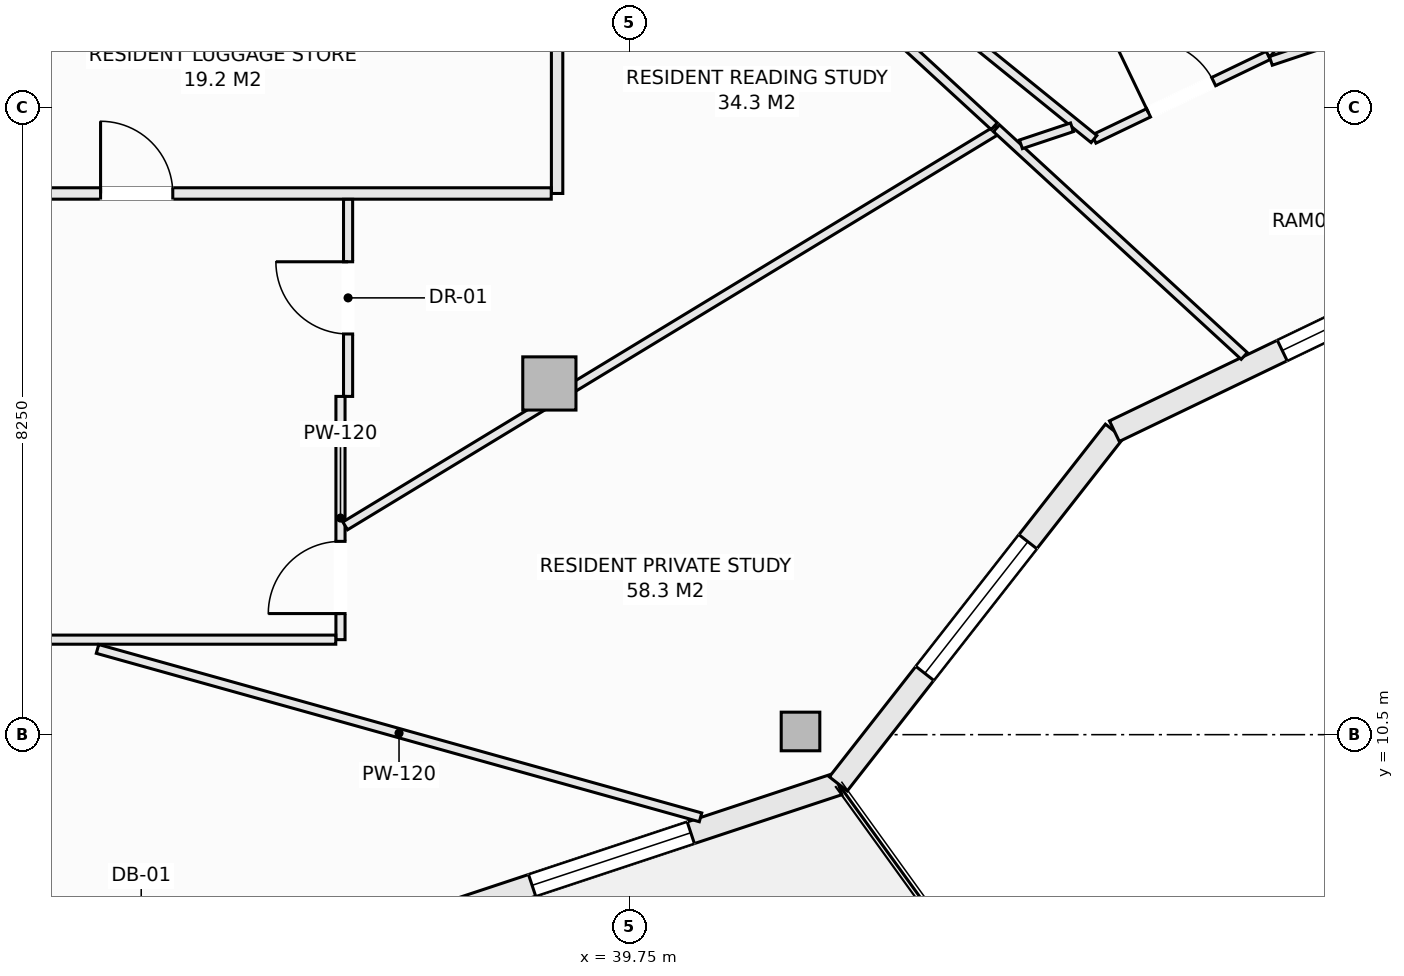
"""IFC4 building model, lengths in metres.
Left out: names, types, materials, properties, quantities, classifications, styles, units other than length and angle.
Written with IfcOpenShell. Run it as: python <this file> out.ifc"""

import sys

from ifc_helpers import new_model, si_unit, direction, frame, frame_2d, origin, origin_2d, place, context, subcontext, project, spatial, rectangle, hollow_rectangle, extrude, element, fill, save


model = new_model("IFC4")
c1 = context("Model", 3, precision=1e-05, world=origin(), true_north=direction((0.0, 1.0)))
c2 = subcontext(c1, "Body", "Model", "MODEL_VIEW")
j1 = project(units=[si_unit("LENGTHUNIT", "METRE"), si_unit("PLANEANGLEUNIT", "RADIAN")], contexts=[c1])
p1 = place(None, origin())
s1 = spatial("IfcSite", under=j1, at=p1, CompositionType="ELEMENT")
p2 = place(p1, origin())
s2 = spatial("IfcBuilding", under=s1, at=p2, CompositionType="ELEMENT")
p3 = place(p2, frame((0.0, 0.0, 222.8)))
s3 = spatial("IfcBuildingStorey", under=s2, at=p3, CompositionType="ELEMENT", Elevation=222.8)
p4 = place(p3, frame((42.003, 10.542, -0.27), z_axis=(0.0, 0.0, 1.0), x_axis=(1.0, 0.0, 0.0)))
e1 = element("IfcColumn", 1, at=p4, inside=s3, PredefinedType="COLUMN", context=c2, shape_type="SweptSolid", body=[
    extrude(hollow_rectangle(XDim=0.508, YDim=0.508, WallThickness=0.019, at=origin_2d()), origin(), (0.0, 0.0, 1.0), 3.3),
])
p5 = place(p3, frame((38.698, 15.121, -0.27), z_axis=(0.0, 0.0, 1.0), x_axis=(1.0, 0.0, 0.0)))
e2 = element("IfcColumn", 2, at=p5, inside=s3, PredefinedType="COLUMN", context=c2, shape_type="SweptSolid", body=[
    extrude(rectangle(XDim=0.7, YDim=0.7, at=origin_2d()), origin(), (0.0, 0.0, 1.0), 3.3),
])
p6 = place(p3, frame((36.531, 7.875, 0.0), z_axis=(0.0, 0.0, 1.0), x_axis=(0.949240877604, 0.314550085495, 0.0)))
e3 = element("IfcWall", 3, at=p6, inside=s3, PredefinedType="SOLIDWALL", context=c2, shape_type="SweptSolid", body=[
    extrude(rectangle(XDim=6.288, YDim=0.3, at=frame_2d((3.144, 0.0))), origin(), (0.0, 0.0, 1.0), 2.605),
])
p7 = place(p6, frame((2.044, 0.0, 0.72)))
e4 = element("IfcOpeningElement", 4, at=p7, cuts=e3, PredefinedType="OPENING", context=c2, shape_type="SweptSolid", body=[
    extrude(rectangle(XDim=2.2, YDim=1.65, at=frame_2d((1.1, 0.825))), frame((0.0, 0.16, 0.0), z_axis=(0.0, -1.0, 0.0), x_axis=(1.0, 0.0, 0.0)), (0.0, 0.0, 1.0), 0.32),
])
p8 = place(p3, frame((42.5, 9.853, 0.0), z_axis=(0.0, 0.0, 1.0), x_axis=(0.616450126935, 0.787393955401, 0.0)))
e5 = element("IfcWall", 5, at=p8, inside=s3, PredefinedType="SOLIDWALL", context=c2, shape_type="SweptSolid", body=[
    extrude(rectangle(XDim=5.893, YDim=0.3, at=frame_2d((2.946, 0.0))), origin(), (0.0, 0.0, 1.0), 2.605),
])
p9 = place(p8, frame((1.846, 0.0, 0.72)))
e6 = element("IfcOpeningElement", 6, at=p9, cuts=e5, PredefinedType="OPENING", context=c2, shape_type="SweptSolid", body=[
    extrude(rectangle(XDim=2.2, YDim=1.65, at=frame_2d((1.1, 0.825))), frame((0.0, 0.16, 0.0), z_axis=(0.0, -1.0, 0.0), x_axis=(1.0, 0.0, 0.0)), (0.0, 0.0, 1.0), 0.32),
])
p10 = place(p3, frame((46.133, 14.493, 0.0), z_axis=(0.0, 0.0, 1.0), x_axis=(0.901348331142, 0.433094892545, 0.0)))
e7 = element("IfcWall", 7, at=p10, inside=s3, PredefinedType="SOLIDWALL", context=c2, shape_type="SweptSolid", body=[
    extrude(rectangle(XDim=6.021, YDim=0.3, at=frame_2d((3.01, 0.0))), origin(), (0.0, 0.0, 1.0), 2.605),
])
p11 = place(p10, frame((2.45, 0.0, 0.72)))
e8 = element("IfcOpeningElement", 8, at=p11, cuts=e7, PredefinedType="OPENING", context=c2, shape_type="SweptSolid", body=[
    extrude(rectangle(XDim=2.2, YDim=1.65, at=frame_2d((1.1, 0.825))), frame((0.0, 0.16, 0.0), z_axis=(0.0, -1.0, 0.0), x_axis=(1.0, 0.0, 0.0)), (0.0, 0.0, 1.0), 0.32),
])
p12 = place(p3, frame((38.8, 17.62, 0.0), z_axis=(0.0, 0.0, 1.0), x_axis=(0.0, 1.0, 0.0)))
e9 = element("IfcWall", 9, at=p12, inside=s3, PredefinedType="PARTITIONING", context=c2, shape_type="SweptSolid", body=[
    extrude(rectangle(XDim=2.18, YDim=0.15, at=frame_2d((1.09, 0.0))), origin(), (0.0, 0.0, 1.0), 3.03),
])
p13 = place(p3, frame((30.077, 17.62, 0.0), z_axis=(0.0, 0.0, 1.0), x_axis=(1.0, 0.0, 0.0)))
e10 = element("IfcWall", 10, at=p13, inside=s3, PredefinedType="PARTITIONING", context=c2, shape_type="SweptSolid", body=[
    extrude(rectangle(XDim=8.646, YDim=0.15, at=frame_2d((4.323, 0.0))), origin(), (0.0, 0.0, 1.0), 3.03),
])
p14 = place(p13, frame((2.717, 0.0, 0.0)))
e11 = element("IfcOpeningElement", 11, at=p14, cuts=e10, PredefinedType="OPENING", context=c2, shape_type="SweptSolid", body=[
    extrude(rectangle(XDim=0.95, YDim=2.1, at=frame_2d((0.475, 1.05))), frame((0.0, 0.085, 0.0), z_axis=(0.0, -1.0, 0.0), x_axis=(1.0, 0.0, 0.0)), (0.0, 0.0, 1.0), 0.17),
])
p15 = place(p3, frame((41.52, 24.892, 0.0), z_axis=(0.0, 0.0, 1.0), x_axis=(0.777027167904, -0.629467060567, 0.0)))
e12 = element("IfcWall", 12, at=p15, inside=s3, PredefinedType="PARTITIONING", context=c2, shape_type="SweptSolid", body=[
    extrude(rectangle(XDim=8.62, YDim=0.12, at=frame_2d((4.31, 0.0))), origin(), (0.0, 0.0, 1.0), 2.77),
])
p16 = place(p15, frame((5.4, 0.0, 0.0)))
e13 = element("IfcOpeningElement", 13, at=p16, cuts=e12, PredefinedType="OPENING", context=c2, shape_type="SweptSolid", body=[
    extrude(rectangle(XDim=0.95, YDim=2.1, at=frame_2d((0.475, 1.05))), frame((0.0, 0.07, 0.0), z_axis=(0.0, -1.0, 0.0), x_axis=(1.0, 0.0, 0.0)), (0.0, 0.0, 1.0), 0.14),
])
p17 = place(p15, frame((1.578, 0.0, 0.0)))
e14 = element("IfcOpeningElement", 14, at=p17, cuts=e12, PredefinedType="OPENING", context=c2, shape_type="SweptSolid", body=[
    extrude(rectangle(XDim=0.95, YDim=2.1, at=frame_2d((0.475, 1.05))), frame((0.0, 0.07, 0.0), z_axis=(0.0, -1.0, 0.0), x_axis=(1.0, 0.0, 0.0)), (0.0, 0.0, 1.0), 0.14),
])
p18 = place(p3, frame((45.864, 18.336, 0.0), z_axis=(0.0, 0.0, 1.0), x_axis=(0.901512568896, 0.432752918097, 0.0)))
e15 = element("IfcWall", 15, at=p18, inside=s3, PredefinedType="PARTITIONING", context=c2, shape_type="SweptSolid", body=[
    extrude(rectangle(XDim=2.543, YDim=0.12, at=frame_2d((1.271, 0.0))), origin(), (0.0, 0.0, 1.0), 3.03),
])
p19 = place(p18, frame((0.796, 0.0, 0.0)))
e16 = element("IfcOpeningElement", 16, at=p19, cuts=e15, PredefinedType="OPENING", context=c2, shape_type="SweptSolid", body=[
    extrude(rectangle(XDim=0.95, YDim=2.1, at=frame_2d((0.475, 1.05))), frame((0.0, 0.07, 0.0), z_axis=(0.0, -1.0, 0.0), x_axis=(1.0, 0.0, 0.0)), (0.0, 0.0, 1.0), 0.14),
])
p20 = place(p3, frame((42.198, 21.306, 0.0), z_axis=(0.0, 0.0, 1.0), x_axis=(0.777012245854, -0.629485480208, 0.0)))
e17 = element("IfcWall", 17, at=p20, inside=s3, PredefinedType="PARTITIONING", context=c2, shape_type="SweptSolid", body=[
    extrude(rectangle(XDim=4.718, YDim=0.12, at=frame_2d((2.359, 0.0))), origin(), (0.0, 0.0, 1.0), 2.77),
])
p21 = place(p3, frame((36.05, 14.95, 0.0), z_axis=(0.0, 0.0, 1.0), x_axis=(0.0, 1.0, 0.0)))
e18 = element("IfcWall", 18, at=p21, inside=s3, PredefinedType="PARTITIONING", context=c2, shape_type="SweptSolid", body=[
    extrude(rectangle(XDim=2.593, YDim=0.12, at=frame_2d((1.296, 0.0))), origin(), (0.0, 0.0, 1.0), 3.03),
])
p22 = place(p21, frame((0.822, 0.0, 0.0)))
e19 = element("IfcOpeningElement", 19, at=p22, cuts=e18, PredefinedType="OPENING", context=c2, shape_type="SweptSolid", body=[
    extrude(rectangle(XDim=0.95, YDim=2.1, at=frame_2d((0.475, 1.05))), frame((0.0, 0.07, 0.0), z_axis=(0.0, -1.0, 0.0), x_axis=(1.0, 0.0, 0.0)), (0.0, 0.0, 1.0), 0.14),
])
p23 = place(p3, frame((35.95, 11.75, 0.0), z_axis=(0.0, 0.0, 1.0), x_axis=(0.0, 1.0, 0.0)))
e20 = element("IfcWall", 20, at=p23, inside=s3, PredefinedType="PARTITIONING", context=c2, shape_type="SweptSolid", body=[
    extrude(rectangle(XDim=3.2, YDim=0.12, at=frame_2d((1.6, 0.0))), origin(), (0.0, 0.0, 1.0), 3.03),
])
p24 = place(p23, frame((0.343, 0.0, 0.0)))
e21 = element("IfcOpeningElement", 21, at=p24, cuts=e20, PredefinedType="OPENING", context=c2, shape_type="SweptSolid", body=[
    extrude(rectangle(XDim=0.95, YDim=2.1, at=frame_2d((0.475, 1.05))), frame((0.0, 0.07, 0.0), z_axis=(0.0, -1.0, 0.0), x_axis=(1.0, 0.0, 0.0)), (0.0, 0.0, 1.0), 0.14),
])
p25 = place(p3, frame((27.227, 11.75, 0.0), z_axis=(0.0, 0.0, 1.0), x_axis=(1.0, 0.0, 0.0)))
e22 = element("IfcWall", 22, at=p25, inside=s3, PredefinedType="PARTITIONING", context=c2, shape_type="SweptSolid", body=[
    extrude(rectangle(XDim=8.661, YDim=0.12, at=frame_2d((4.331, 0.0))), origin(), (0.0, 0.0, 1.0), 3.03),
])
p26 = place(p25, frame((2.602, 0.0, 0.0)))
e23 = element("IfcOpeningElement", 23, at=p26, cuts=e22, PredefinedType="OPENING", context=c2, shape_type="SweptSolid", body=[
    extrude(rectangle(XDim=0.95, YDim=2.1, at=frame_2d((0.475, 1.05))), frame((0.0, 0.07, 0.0), z_axis=(0.0, -1.0, 0.0), x_axis=(1.0, 0.0, 0.0)), (0.0, 0.0, 1.0), 0.14),
])
p27 = place(p3, frame((32.753, 11.628, 0.0), z_axis=(0.0, 0.0, 1.0), x_axis=(0.96314203236, -0.26899335587, 0.0)))
e24 = element("IfcWall", 24, at=p27, inside=s3, PredefinedType="PARTITIONING", context=c2, shape_type="SweptSolid", body=[
    extrude(rectangle(XDim=8.238, YDim=0.12, at=frame_2d((4.119, 0.0))), origin(), (0.0, 0.0, 1.0), 2.605),
])
p28 = place(p3, frame((36.012, 13.247, 0.0), z_axis=(0.0, 0.0, 1.0), x_axis=(0.85474937032, 0.519040955934, 0.0)))
e25 = element("IfcWall", 25, at=p28, inside=s3, PredefinedType="PARTITIONING", context=c2, shape_type="SweptSolid", body=[
    extrude(rectangle(XDim=10.04, YDim=0.12, at=frame_2d((5.02, 0.0))), origin(), (0.0, 0.0, 1.0), 3.03),
])
p29 = place(p3, frame((39.706, 22.958, 0.0), z_axis=(0.0, 0.0, 1.0), x_axis=(0.73633751064, -0.676614417837, 0.0)))
e26 = element("IfcWall", 26, at=p29, inside=s3, PredefinedType="PARTITIONING", context=c2, shape_type="SweptSolid", body=[
    extrude(rectangle(XDim=6.582, YDim=0.12, at=frame_2d((3.291, 0.0))), origin(), (0.0, 0.0, 1.0), 3.03),
])
p30 = place(p3, frame((44.581, 18.478, 0.0), z_axis=(0.0, 0.0, 1.0), x_axis=(0.736361674887, -0.676588119729, 0.0)))
e27 = element("IfcWall", 27, at=p30, inside=s3, PredefinedType="PARTITIONING", context=c2, shape_type="SweptSolid", body=[
    extrude(rectangle(XDim=4.427, YDim=0.12, at=frame_2d((2.214, 0.0))), origin(), (0.0, 0.0, 1.0), 3.03),
])
p31 = place(p3, frame((44.903, 18.267, 0.0), z_axis=(0.0, 0.0, 1.0), x_axis=(0.948614335511, 0.316434578488, 0.0)))
e28 = element("IfcWall", 28, at=p31, inside=s3, PredefinedType="PARTITIONING", context=c2, shape_type="SweptSolid", body=[
    extrude(rectangle(XDim=0.708, YDim=0.12, at=frame_2d((0.354, 0.0))), origin(), (0.0, 0.0, 1.0), 3.03),
])
p32 = place(p3, frame((48.191, 19.364, 0.0), z_axis=(0.0, 0.0, 1.0), x_axis=(0.948573630056, 0.316556580033, 0.0)))
e29 = element("IfcWall", 29, at=p32, inside=s3, PredefinedType="PARTITIONING", context=c2, shape_type="SweptSolid", body=[
    extrude(rectangle(XDim=5.568, YDim=0.12, at=frame_2d((2.784, 0.0))), origin(), (0.0, 0.0, 1.0), 3.03),
])
p33 = place(p7, origin())
e30 = element("IfcWindow", 30, at=p33, inside=s3, PartitioningType="SINGLE_PANEL", PredefinedType="WINDOW", context=c2, shape_type="SweptSolid", body=[
    extrude(rectangle(XDim=2.2, YDim=1.65, at=frame_2d((1.1, 0.825))), frame((0.0, 0.03, 0.0), z_axis=(0.0, -1.0, 0.0), x_axis=(1.0, 0.0, 0.0)), (0.0, 0.0, 1.0), 0.06),
])
fill(e4, e30)
p34 = place(p9, origin())
e31 = element("IfcWindow", 31, at=p34, inside=s3, PartitioningType="SINGLE_PANEL", PredefinedType="WINDOW", context=c2, shape_type="SweptSolid", body=[
    extrude(rectangle(XDim=2.2, YDim=1.65, at=frame_2d((1.1, 0.825))), frame((0.0, 0.03, 0.0), z_axis=(0.0, -1.0, 0.0), x_axis=(1.0, 0.0, 0.0)), (0.0, 0.0, 1.0), 0.06),
])
fill(e6, e31)
p35 = place(p11, origin())
e32 = element("IfcWindow", 32, at=p35, inside=s3, PartitioningType="SINGLE_PANEL", PredefinedType="WINDOW", context=c2, shape_type="SweptSolid", body=[
    extrude(rectangle(XDim=2.2, YDim=1.65, at=frame_2d((1.1, 0.825))), frame((0.0, 0.03, 0.0), z_axis=(0.0, -1.0, 0.0), x_axis=(1.0, 0.0, 0.0)), (0.0, 0.0, 1.0), 0.06),
])
fill(e8, e32)
p36 = place(p14, origin())
e33 = element("IfcDoor", 33, at=p36, inside=s3, OperationType="SINGLE_SWING_LEFT", PredefinedType="DOOR", context=c2, shape_type="SweptSolid", body=[
    extrude(rectangle(XDim=0.95, YDim=2.1, at=frame_2d((0.475, 1.05))), frame((0.0, 0.025, 0.0), z_axis=(0.0, -1.0, 0.0), x_axis=(1.0, 0.0, 0.0)), (0.0, 0.0, 1.0), 0.05),
])
fill(e11, e33)
p37 = place(p24, origin())
e34 = element("IfcDoor", 34, at=p37, inside=s3, OperationType="SINGLE_SWING_LEFT", PredefinedType="DOOR", context=c2, shape_type="SweptSolid", body=[
    extrude(rectangle(XDim=0.95, YDim=2.1, at=frame_2d((0.475, 1.05))), frame((0.0, 0.025, 0.0), z_axis=(0.0, -1.0, 0.0), x_axis=(1.0, 0.0, 0.0)), (0.0, 0.0, 1.0), 0.05),
])
fill(e21, e34)
p38 = place(p22, origin())
e35 = element("IfcDoor", 35, at=p38, inside=s3, OperationType="SINGLE_SWING_RIGHT", PredefinedType="DOOR", context=c2, shape_type="SweptSolid", body=[
    extrude(rectangle(XDim=0.95, YDim=2.1, at=frame_2d((0.475, 1.05))), frame((0.0, 0.025, 0.0), z_axis=(0.0, -1.0, 0.0), x_axis=(1.0, 0.0, 0.0)), (0.0, 0.0, 1.0), 0.05),
])
fill(e19, e35)
p39 = place(p19, origin())
e36 = element("IfcDoor", 36, at=p39, inside=s3, OperationType="SINGLE_SWING_LEFT", PredefinedType="DOOR", context=c2, shape_type="SweptSolid", body=[
    extrude(rectangle(XDim=0.95, YDim=2.1, at=frame_2d((0.475, 1.05))), frame((0.0, 0.025, 0.0), z_axis=(0.0, -1.0, 0.0), x_axis=(1.0, 0.0, 0.0)), (0.0, 0.0, 1.0), 0.05),
])
fill(e16, e36)
save(model, sys.argv[1])
